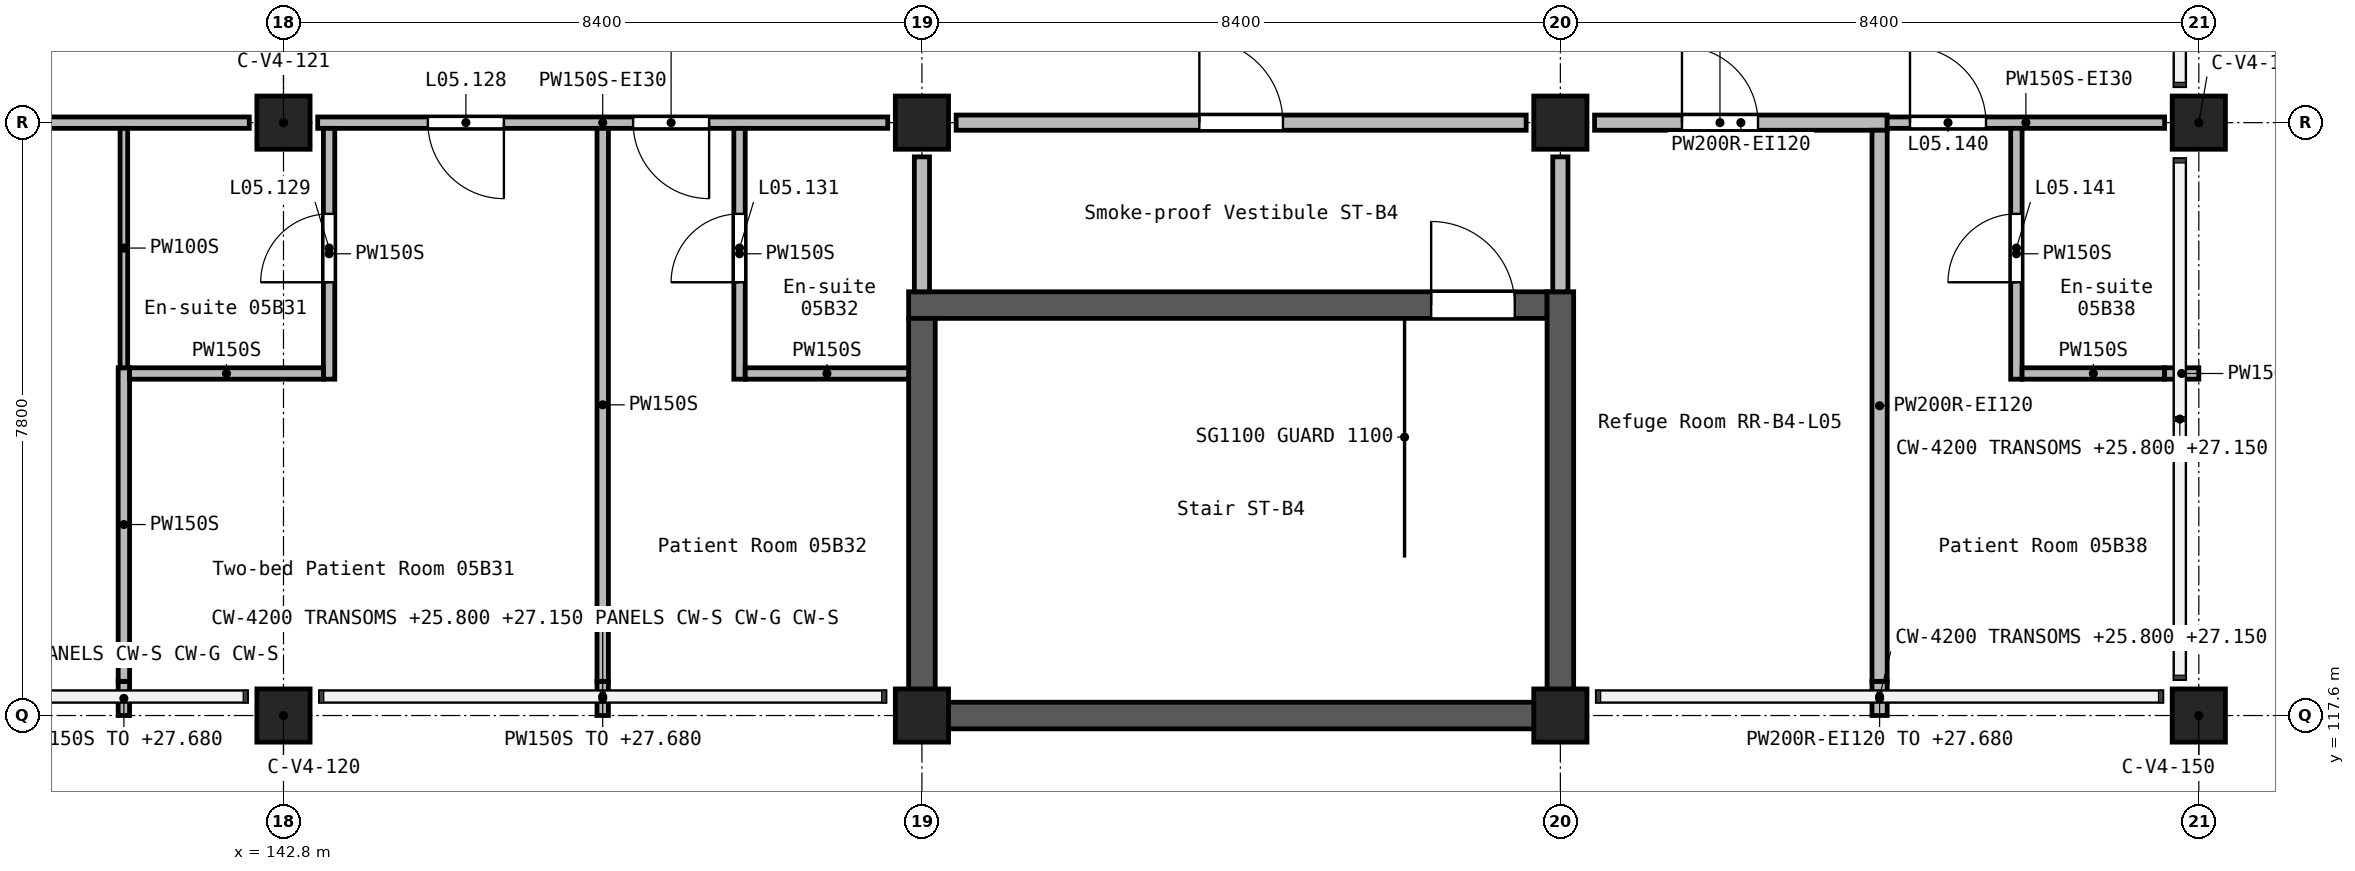
"""IFC4 building model, lengths in metres.
Left out: names, types, materials, properties, quantities, classifications, styles, units other than length and angle.
Written with IfcOpenShell. Run it as: python <this file> out.ifc"""

import sys

from ifc_helpers import new_model, si_unit, direction, frame, frame_2d, origin, origin_2d, place, context, subcontext, project, spatial, rectangle, extrude, element, fill, save


model = new_model("IFC4")
c1 = context("Model", 3, precision=1e-05, world=origin(), true_north=direction((0.0, 1.0)))
c2 = subcontext(c1, "Body", "Model", "MODEL_VIEW")
j1 = project(units=[si_unit("LENGTHUNIT", "METRE"), si_unit("PLANEANGLEUNIT", "RADIAN")], contexts=[c1])
p1 = place(None, origin())
s1 = spatial("IfcSite", under=j1, at=p1, CompositionType="ELEMENT")
p2 = place(p1, origin())
s2 = spatial("IfcBuilding", under=s1, at=p2, CompositionType="ELEMENT")
p3 = place(p2, frame((0.0, 0.0, 24.9)))
s3 = spatial("IfcBuildingStorey", under=s2, at=p3, CompositionType="ELEMENT", Elevation=24.9)
for number, where, z_axis, x_axis in (
    (1, (142.8, 117.6, 0.0), (0.0, 0.0, 1.0), (1.0, 0.0, 0.0)),
    (2, (142.8, 125.4, 0.0), (0.0, 0.0, 1.0), (1.0, 0.0, 0.0)),
    (3, (151.2, 117.6, 0.0), (0.0, 0.0, 1.0), (1.0, 0.0, 0.0)),
    (4, (151.2, 125.4, 0.0), (0.0, 0.0, 1.0), (1.0, 0.0, 0.0)),
    (5, (159.6, 117.6, 0.0), (0.0, 0.0, 1.0), (1.0, 0.0, 0.0)),
    (6, (159.6, 125.4, 0.0), (0.0, 0.0, 1.0), (1.0, 0.0, 0.0)),
    (7, (168.0, 117.6, 0.0), (0.0, 0.0, 1.0), (1.0, 0.0, 0.0)),
    (8, (168.0, 125.4, 0.0), (0.0, 0.0, 1.0), (1.0, 0.0, 0.0)),
):
    element("IfcColumn", number, at=place(p3, frame(where, z_axis=z_axis, x_axis=x_axis)), inside=s3, PredefinedType="COLUMN", context=c2, shape_type="SweptSolid", body=[
        extrude(rectangle(XDim=0.7, YDim=0.7, at=origin_2d()), origin(), (0.0, 0.0, 1.0), 3.9),
    ])
p4 = place(p3, frame((151.025, 123.0, 0.0), z_axis=(0.0, 0.0, 1.0), x_axis=(1.0, 0.0, 0.0)))
e9 = element("IfcWall", 9, at=p4, inside=s3, PredefinedType="SHEAR", context=c2, shape_type="SweptSolid", body=[
    extrude(rectangle(XDim=8.4, YDim=0.35, at=frame_2d((4.2, 0.0))), origin(), (0.0, 0.0, 1.0), 3.9),
])
p5 = place(p4, frame((6.875, 0.0, 0.0)))
e10 = element("IfcOpeningElement", 10, at=p5, cuts=e9, PredefinedType="OPENING", context=c2, shape_type="SweptSolid", body=[
    extrude(rectangle(XDim=1.1, YDim=2.1, at=frame_2d((0.55, 1.05))), frame((0.0, 0.185, 0.0), z_axis=(0.0, -1.0, 0.0), x_axis=(1.0, 0.0, 0.0)), (0.0, 0.0, 1.0), 0.37),
])
p6 = place(p3, frame((151.2, 117.425, 0.0), z_axis=(0.0, 0.0, 1.0), x_axis=(0.0, 1.0, 0.0)))
e11 = element("IfcWall", 11, at=p6, inside=s3, PredefinedType="SHEAR", context=c2, shape_type="SweptSolid", body=[
    extrude(rectangle(XDim=5.4, YDim=0.35, at=frame_2d((2.7, 0.0))), origin(), (0.0, 0.0, 1.0), 3.9),
])
p7 = place(p3, frame((151.375, 117.6, 0.0), z_axis=(0.0, 0.0, 1.0), x_axis=(1.0, 0.0, 0.0)))
e12 = element("IfcWall", 12, at=p7, inside=s3, PredefinedType="SHEAR", context=c2, shape_type="SweptSolid", body=[
    extrude(rectangle(XDim=8.05, YDim=0.35, at=frame_2d((4.025, 0.0))), origin(), (0.0, 0.0, 1.0), 3.9),
])
p8 = place(p3, frame((159.6, 117.425, 0.0), z_axis=(0.0, 0.0, 1.0), x_axis=(0.0, 1.0, 0.0)))
e13 = element("IfcWall", 13, at=p8, inside=s3, PredefinedType="SHEAR", context=c2, shape_type="SweptSolid", body=[
    extrude(rectangle(XDim=5.75, YDim=0.35, at=frame_2d((2.875, 0.0))), origin(), (0.0, 0.0, 1.0), 3.9),
])
p9 = place(p3, frame((151.65, 125.4, 0.0), z_axis=(0.0, 0.0, 1.0), x_axis=(1.0, 0.0, 0.0)))
e14 = element("IfcWall", 14, at=p9, inside=s3, PredefinedType="SOLIDWALL", context=c2, shape_type="SweptSolid", body=[
    extrude(rectangle(XDim=7.5, YDim=0.2, at=frame_2d((3.75, 0.0))), origin(), (0.0, 0.0, 1.0), 3.6),
])
p10 = place(p9, frame((3.2, 0.0, 0.0)))
e15 = element("IfcOpeningElement", 15, at=p10, cuts=e14, PredefinedType="OPENING", context=c2, shape_type="SweptSolid", body=[
    extrude(rectangle(XDim=1.1, YDim=2.1, at=frame_2d((0.55, 1.05))), frame((0.0, 0.11, 0.0), z_axis=(0.0, -1.0, 0.0), x_axis=(1.0, 0.0, 0.0)), (0.0, 0.0, 1.0), 0.22),
])
p11 = place(p3, frame((160.05, 125.4, 0.0), z_axis=(0.0, 0.0, 1.0), x_axis=(1.0, 0.0, 0.0)))
e16 = element("IfcWall", 16, at=p11, inside=s3, PredefinedType="SOLIDWALL", context=c2, shape_type="SweptSolid", body=[
    extrude(rectangle(XDim=3.85, YDim=0.2, at=frame_2d((1.925, 0.0))), origin(), (0.0, 0.0, 1.0), 3.6),
])
p12 = place(p11, frame((1.15, 0.0, 0.0)))
e17 = element("IfcOpeningElement", 17, at=p12, cuts=e16, PredefinedType="OPENING", context=c2, shape_type="SweptSolid", body=[
    extrude(rectangle(XDim=1.0, YDim=2.1, at=frame_2d((0.5, 1.05))), frame((0.0, 0.11, 0.0), z_axis=(0.0, -1.0, 0.0), x_axis=(1.0, 0.0, 0.0)), (0.0, 0.0, 1.0), 0.22),
])
p13 = place(p3, frame((159.6, 123.175, 0.0), z_axis=(0.0, 0.0, 1.0), x_axis=(0.0, 1.0, 0.0)))
e18 = element("IfcWall", 18, at=p13, inside=s3, PredefinedType="SOLIDWALL", context=c2, shape_type="SweptSolid", body=[
    extrude(rectangle(XDim=1.775, YDim=0.2, at=frame_2d((0.887, 0.0))), origin(), (0.0, 0.0, 1.0), 3.6),
])
p14 = place(p3, frame((163.8, 117.6, 0.0), z_axis=(0.0, 0.0, 1.0), x_axis=(0.0, 1.0, 0.0)))
e19 = element("IfcWall", 19, at=p14, inside=s3, PredefinedType="SOLIDWALL", context=c2, shape_type="SweptSolid", body=[
    extrude(rectangle(XDim=0.45, YDim=0.2, at=frame_2d((0.225, 0.0))), origin(), (0.0, 0.0, 1.0), 2.78),
])
p15 = place(p3, frame((163.8, 118.05, 0.0), z_axis=(0.0, 0.0, 1.0), x_axis=(0.0, 1.0, 0.0)))
e20 = element("IfcWall", 20, at=p15, inside=s3, PredefinedType="SOLIDWALL", context=c2, shape_type="SweptSolid", body=[
    extrude(rectangle(XDim=7.25, YDim=0.2, at=frame_2d((3.625, 0.0))), origin(), (0.0, 0.0, 1.0), 3.6),
])
p16 = place(p3, frame((151.2, 123.175, 0.0), z_axis=(0.0, 0.0, 1.0), x_axis=(0.0, 1.0, 0.0)))
e21 = element("IfcWall", 21, at=p16, inside=s3, PredefinedType="SOLIDWALL", context=c2, shape_type="SweptSolid", body=[
    extrude(rectangle(XDim=1.775, YDim=0.2, at=frame_2d((0.887, 0.0))), origin(), (0.0, 0.0, 1.0), 3.6),
])
p17 = place(p3, frame((150.75, 125.4, 0.0), z_axis=(0.0, 0.0, 1.0), x_axis=(-1.0, 0.0, 0.0)))
e22 = element("IfcWall", 22, at=p17, inside=s3, PredefinedType="PARTITIONING", context=c2, shape_type="SweptSolid", body=[
    extrude(rectangle(XDim=7.5, YDim=0.15, at=frame_2d((3.75, 0.0))), origin(), (0.0, 0.0, 1.0), 3.6),
])
p18 = place(p17, frame((5.05, 0.0, 0.0)))
e23 = element("IfcOpeningElement", 23, at=p18, cuts=e22, PredefinedType="OPENING", context=c2, shape_type="SweptSolid", body=[
    extrude(rectangle(XDim=1.0, YDim=2.1, at=frame_2d((0.5, 1.05))), frame((0.0, 0.085, 0.0), z_axis=(0.0, -1.0, 0.0), x_axis=(1.0, 0.0, 0.0)), (0.0, 0.0, 1.0), 0.17),
])
p19 = place(p17, frame((2.35, 0.0, 0.0)))
e24 = element("IfcOpeningElement", 24, at=p19, cuts=e22, PredefinedType="OPENING", context=c2, shape_type="SweptSolid", body=[
    extrude(rectangle(XDim=1.0, YDim=2.1, at=frame_2d((0.5, 1.05))), frame((0.0, 0.085, 0.0), z_axis=(0.0, -1.0, 0.0), x_axis=(1.0, 0.0, 0.0)), (0.0, 0.0, 1.0), 0.17),
])
p20 = place(p3, frame((142.35, 125.4, 0.0), z_axis=(0.0, 0.0, 1.0), x_axis=(-1.0, 0.0, 0.0)))
e25 = element("IfcWall", 25, at=p20, inside=s3, PredefinedType="PARTITIONING", context=c2, shape_type="SweptSolid", body=[
    extrude(rectangle(XDim=7.5, YDim=0.15, at=frame_2d((3.75, 0.0))), origin(), (0.0, 0.0, 1.0), 3.6),
])
p21 = place(p20, frame((3.9, 0.0, 0.0)))
e26 = element("IfcOpeningElement", 26, at=p21, cuts=e25, PredefinedType="OPENING", context=c2, shape_type="SweptSolid", body=[
    extrude(rectangle(XDim=1.8, YDim=2.1, at=frame_2d((0.9, 1.05))), frame((0.0, 0.085, 0.0), z_axis=(0.0, -1.0, 0.0), x_axis=(1.0, 0.0, 0.0)), (0.0, 0.0, 1.0), 0.17),
])
p22 = place(p3, frame((163.9, 125.4, 0.0), z_axis=(0.0, 0.0, 1.0), x_axis=(1.0, 0.0, 0.0)))
e27 = element("IfcWall", 27, at=p22, inside=s3, PredefinedType="PARTITIONING", context=c2, shape_type="SweptSolid", body=[
    extrude(rectangle(XDim=3.65, YDim=0.15, at=frame_2d((1.825, 0.0))), origin(), (0.0, 0.0, 1.0), 3.6),
])
p23 = place(p22, frame((0.3, 0.0, 0.0)))
e28 = element("IfcOpeningElement", 28, at=p23, cuts=e27, PredefinedType="OPENING", context=c2, shape_type="SweptSolid", body=[
    extrude(rectangle(XDim=1.0, YDim=2.1, at=frame_2d((0.5, 1.05))), frame((0.0, 0.085, 0.0), z_axis=(0.0, -1.0, 0.0), x_axis=(1.0, 0.0, 0.0)), (0.0, 0.0, 1.0), 0.17),
])
p24 = place(p3, frame((147.0, 117.6, 0.0), z_axis=(0.0, 0.0, 1.0), x_axis=(0.0, 1.0, 0.0)))
e29 = element("IfcWall", 29, at=p24, inside=s3, PredefinedType="PARTITIONING", context=c2, shape_type="SweptSolid", body=[
    extrude(rectangle(XDim=0.45, YDim=0.15, at=frame_2d((0.225, 0.0))), origin(), (0.0, 0.0, 1.0), 2.78),
])
p25 = place(p3, frame((147.0, 118.05, 0.0), z_axis=(0.0, 0.0, 1.0), x_axis=(0.0, 1.0, 0.0)))
e30 = element("IfcWall", 30, at=p25, inside=s3, PredefinedType="PARTITIONING", context=c2, shape_type="SweptSolid", body=[
    extrude(rectangle(XDim=7.275, YDim=0.15, at=frame_2d((3.637, 0.0))), origin(), (0.0, 0.0, 1.0), 3.6),
])
p26 = place(p3, frame((140.7, 117.6, 0.0), z_axis=(0.0, 0.0, 1.0), x_axis=(0.0, 1.0, 0.0)))
e31 = element("IfcWall", 31, at=p26, inside=s3, PredefinedType="PARTITIONING", context=c2, shape_type="SweptSolid", body=[
    extrude(rectangle(XDim=0.45, YDim=0.15, at=frame_2d((0.225, 0.0))), origin(), (0.0, 0.0, 1.0), 2.78),
])
p27 = place(p3, frame((140.7, 118.05, 0.0), z_axis=(0.0, 0.0, 1.0), x_axis=(0.0, 1.0, 0.0)))
e32 = element("IfcWall", 32, at=p27, inside=s3, PredefinedType="PARTITIONING", context=c2, shape_type="SweptSolid", body=[
    extrude(rectangle(XDim=4.125, YDim=0.15, at=frame_2d((2.062, 0.0))), origin(), (0.0, 0.0, 1.0), 3.6),
])
p28 = place(p3, frame((143.4, 122.025, 0.0), z_axis=(0.0, 0.0, 1.0), x_axis=(0.0, 1.0, 0.0)))
e33 = element("IfcWall", 33, at=p28, inside=s3, PredefinedType="PARTITIONING", context=c2, shape_type="SweptSolid", body=[
    extrude(rectangle(XDim=3.3, YDim=0.15, at=frame_2d((1.65, 0.0))), origin(), (0.0, 0.0, 1.0), 3.6),
])
p29 = place(p28, frame((1.275, 0.0, 0.0)))
e34 = element("IfcOpeningElement", 34, at=p29, cuts=e33, PredefinedType="OPENING", context=c2, shape_type="SweptSolid", body=[
    extrude(rectangle(XDim=0.9, YDim=2.1, at=frame_2d((0.45, 1.05))), frame((0.0, 0.085, 0.0), z_axis=(0.0, -1.0, 0.0), x_axis=(1.0, 0.0, 0.0)), (0.0, 0.0, 1.0), 0.17),
])
p30 = place(p3, frame((148.8, 122.025, 0.0), z_axis=(0.0, 0.0, 1.0), x_axis=(0.0, 1.0, 0.0)))
e35 = element("IfcWall", 35, at=p30, inside=s3, PredefinedType="PARTITIONING", context=c2, shape_type="SweptSolid", body=[
    extrude(rectangle(XDim=3.3, YDim=0.15, at=frame_2d((1.65, 0.0))), origin(), (0.0, 0.0, 1.0), 3.6),
])
p31 = place(p30, frame((1.275, 0.0, 0.0)))
e36 = element("IfcOpeningElement", 36, at=p31, cuts=e35, PredefinedType="OPENING", context=c2, shape_type="SweptSolid", body=[
    extrude(rectangle(XDim=0.9, YDim=2.1, at=frame_2d((0.45, 1.05))), frame((0.0, 0.085, 0.0), z_axis=(0.0, -1.0, 0.0), x_axis=(1.0, 0.0, 0.0)), (0.0, 0.0, 1.0), 0.17),
])
p32 = place(p3, frame((165.6, 122.025, 0.0), z_axis=(0.0, 0.0, 1.0), x_axis=(0.0, 1.0, 0.0)))
e37 = element("IfcWall", 37, at=p32, inside=s3, PredefinedType="PARTITIONING", context=c2, shape_type="SweptSolid", body=[
    extrude(rectangle(XDim=3.3, YDim=0.15, at=frame_2d((1.65, 0.0))), origin(), (0.0, 0.0, 1.0), 3.6),
])
p33 = place(p32, frame((1.275, 0.0, 0.0)))
e38 = element("IfcOpeningElement", 38, at=p33, cuts=e37, PredefinedType="OPENING", context=c2, shape_type="SweptSolid", body=[
    extrude(rectangle(XDim=0.9, YDim=2.1, at=frame_2d((0.45, 1.05))), frame((0.0, 0.085, 0.0), z_axis=(0.0, -1.0, 0.0), x_axis=(1.0, 0.0, 0.0)), (0.0, 0.0, 1.0), 0.17),
])
p34 = place(p3, frame((140.775, 122.1, 0.0), z_axis=(0.0, 0.0, 1.0), x_axis=(1.0, 0.0, 0.0)))
e39 = element("IfcWall", 39, at=p34, inside=s3, PredefinedType="PARTITIONING", context=c2, shape_type="SweptSolid", body=[
    extrude(rectangle(XDim=2.55, YDim=0.15, at=frame_2d((1.275, 0.0))), origin(), (0.0, 0.0, 1.0), 3.6),
])
p35 = place(p3, frame((165.675, 122.1, 0.0), z_axis=(0.0, 0.0, 1.0), x_axis=(1.0, 0.0, 0.0)))
e40 = element("IfcWall", 40, at=p35, inside=s3, PredefinedType="PARTITIONING", context=c2, shape_type="SweptSolid", body=[
    extrude(rectangle(XDim=1.875, YDim=0.15, at=frame_2d((0.938, 0.0))), origin(), (0.0, 0.0, 1.0), 3.6),
])
p36 = place(p3, frame((167.55, 122.1, 0.0), z_axis=(0.0, 0.0, 1.0), x_axis=(1.0, 0.0, 0.0)))
e41 = element("IfcWall", 41, at=p36, inside=s3, PredefinedType="PARTITIONING", context=c2, shape_type="SweptSolid", body=[
    extrude(rectangle(XDim=0.45, YDim=0.15, at=frame_2d((0.225, 0.0))), origin(), (0.0, 0.0, 1.0), 2.78),
])
p37 = place(p3, frame((148.875, 122.1, 0.0), z_axis=(0.0, 0.0, 1.0), x_axis=(1.0, 0.0, 0.0)))
e42 = element("IfcWall", 42, at=p37, inside=s3, PredefinedType="PARTITIONING", context=c2, shape_type="SweptSolid", body=[
    extrude(rectangle(XDim=2.15, YDim=0.15, at=frame_2d((1.075, 0.0))), origin(), (0.0, 0.0, 1.0), 3.6),
])
p38 = place(p3, frame((140.7, 122.175, 0.0), z_axis=(0.0, 0.0, 1.0), x_axis=(0.0, 1.0, 0.0)))
e43 = element("IfcWall", 43, at=p38, inside=s3, PredefinedType="PARTITIONING", context=c2, shape_type="SweptSolid", body=[
    extrude(rectangle(XDim=3.15, YDim=0.1, at=frame_2d((1.575, 0.0))), origin(), (0.0, 0.0, 1.0), 3.6),
])
p39 = place(p18, origin())
e44 = element("IfcDoor", 44, at=p39, inside=s3, OperationType="SINGLE_SWING_RIGHT", PredefinedType="DOOR", context=c2, shape_type="SweptSolid", body=[
    extrude(rectangle(XDim=1.0, YDim=2.1, at=frame_2d((0.5, 1.05))), frame((0.0, 0.025, 0.0), z_axis=(0.0, -1.0, 0.0), x_axis=(1.0, 0.0, 0.0)), (0.0, 0.0, 1.0), 0.05),
])
fill(e23, e44)
p40 = place(p29, origin())
e45 = element("IfcDoor", 45, at=p40, inside=s3, OperationType="SINGLE_SWING_RIGHT", PredefinedType="DOOR", context=c2, shape_type="SweptSolid", body=[
    extrude(rectangle(XDim=0.9, YDim=2.1, at=frame_2d((0.45, 1.05))), frame((0.0, 0.025, 0.0), z_axis=(0.0, -1.0, 0.0), x_axis=(1.0, 0.0, 0.0)), (0.0, 0.0, 1.0), 0.05),
])
fill(e34, e45)
p41 = place(p19, origin())
e46 = element("IfcDoor", 46, at=p41, inside=s3, OperationType="SINGLE_SWING_LEFT", PredefinedType="DOOR", context=c2, shape_type="SweptSolid", body=[
    extrude(rectangle(XDim=1.0, YDim=2.1, at=frame_2d((0.5, 1.05))), frame((0.0, 0.025, 0.0), z_axis=(0.0, -1.0, 0.0), x_axis=(1.0, 0.0, 0.0)), (0.0, 0.0, 1.0), 0.05),
])
fill(e24, e46)
p42 = place(p31, frame((0.9, 0.0, 0.0), z_axis=(0.0, 0.0, 1.0), x_axis=(-1.0, 0.0, 0.0)))
e47 = element("IfcDoor", 47, at=p42, inside=s3, OperationType="SINGLE_SWING_LEFT", PredefinedType="DOOR", context=c2, shape_type="SweptSolid", body=[
    extrude(rectangle(XDim=0.9, YDim=2.1, at=frame_2d((0.45, 1.05))), frame((0.0, 0.025, 0.0), z_axis=(0.0, -1.0, 0.0), x_axis=(1.0, 0.0, 0.0)), (0.0, 0.0, 1.0), 0.05),
])
fill(e36, e47)
p43 = place(p23, frame((1.0, 0.0, 0.0), z_axis=(0.0, 0.0, 1.0), x_axis=(-1.0, 0.0, 0.0)))
e48 = element("IfcDoor", 48, at=p43, inside=s3, OperationType="SINGLE_SWING_RIGHT", PredefinedType="DOOR", context=c2, shape_type="SweptSolid", body=[
    extrude(rectangle(XDim=1.0, YDim=2.1, at=frame_2d((0.5, 1.05))), frame((0.0, 0.025, 0.0), z_axis=(0.0, -1.0, 0.0), x_axis=(1.0, 0.0, 0.0)), (0.0, 0.0, 1.0), 0.05),
])
fill(e28, e48)
p44 = place(p33, frame((0.9, 0.0, 0.0), z_axis=(0.0, 0.0, 1.0), x_axis=(-1.0, 0.0, 0.0)))
e49 = element("IfcDoor", 49, at=p44, inside=s3, OperationType="SINGLE_SWING_LEFT", PredefinedType="DOOR", context=c2, shape_type="SweptSolid", body=[
    extrude(rectangle(XDim=0.9, YDim=2.1, at=frame_2d((0.45, 1.05))), frame((0.0, 0.025, 0.0), z_axis=(0.0, -1.0, 0.0), x_axis=(1.0, 0.0, 0.0)), (0.0, 0.0, 1.0), 0.05),
])
fill(e38, e49)
p45 = place(p12, frame((1.0, 0.0, 0.0), z_axis=(0.0, 0.0, 1.0), x_axis=(-1.0, 0.0, 0.0)))
e50 = element("IfcDoor", 50, at=p45, inside=s3, OperationType="SINGLE_SWING_RIGHT", PredefinedType="DOOR", context=c2, shape_type="SweptSolid", body=[
    extrude(rectangle(XDim=1.0, YDim=2.1, at=frame_2d((0.5, 1.05))), frame((0.0, 0.025, 0.0), z_axis=(0.0, -1.0, 0.0), x_axis=(1.0, 0.0, 0.0)), (0.0, 0.0, 1.0), 0.05),
])
fill(e17, e50)
p46 = place(p5, frame((1.1, 0.0, 0.0), z_axis=(0.0, 0.0, 1.0), x_axis=(-1.0, 0.0, 0.0)))
e51 = element("IfcDoor", 51, at=p46, inside=s3, OperationType="SINGLE_SWING_LEFT", PredefinedType="DOOR", context=c2, shape_type="SweptSolid", body=[
    extrude(rectangle(XDim=1.1, YDim=2.1, at=frame_2d((0.55, 1.05))), frame((0.0, 0.025, 0.0), z_axis=(0.0, -1.0, 0.0), x_axis=(1.0, 0.0, 0.0)), (0.0, 0.0, 1.0), 0.05),
])
fill(e10, e51)
p47 = place(p10, frame((1.1, 0.0, 0.0), z_axis=(0.0, 0.0, 1.0), x_axis=(-1.0, 0.0, 0.0)))
e52 = element("IfcDoor", 52, at=p47, inside=s3, OperationType="SINGLE_SWING_LEFT", PredefinedType="DOOR", context=c2, shape_type="SweptSolid", body=[
    extrude(rectangle(XDim=1.1, YDim=2.1, at=frame_2d((0.55, 1.05))), frame((0.0, 0.025, 0.0), z_axis=(0.0, -1.0, 0.0), x_axis=(1.0, 0.0, 0.0)), (0.0, 0.0, 1.0), 0.05),
])
fill(e15, e52)
save(model, sys.argv[1])
